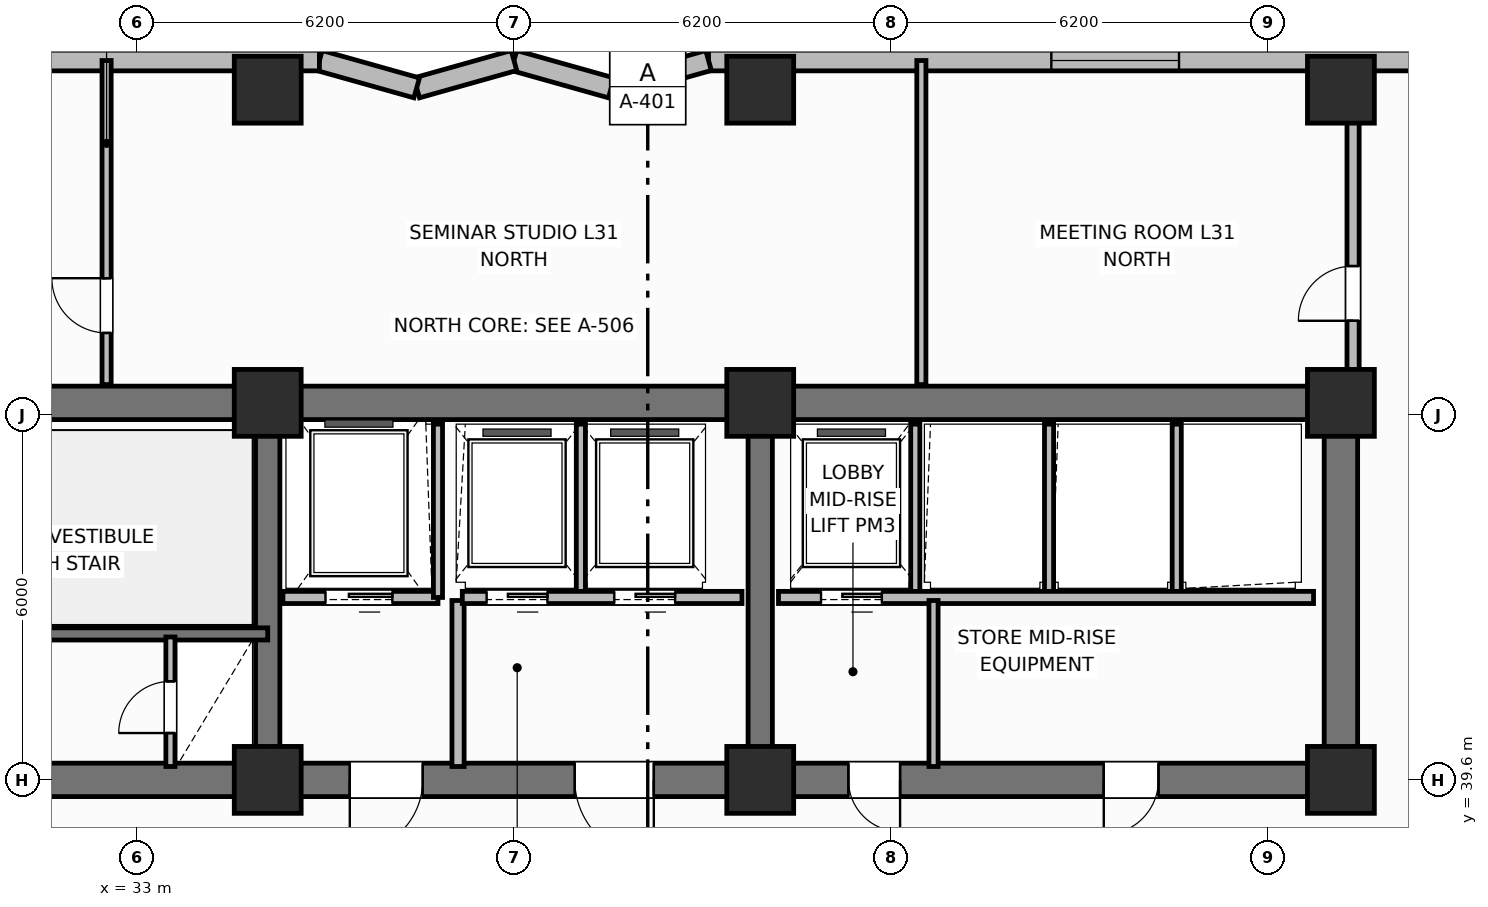
"""IFC4 building model, lengths in metres.
Left out: names, types, materials, properties, quantities, classifications, styles, units other than length and angle.
Written with IfcOpenShell. Run it as: python <this file> out.ifc"""

import sys

from ifc_helpers import new_model, si_unit, direction, frame, frame_2d, origin, origin_2d, place, context, subcontext, project, spatial, rectangle, extrude, element, fill, save


model = new_model("IFC4")
c1 = context("Model", 3, precision=1e-05, world=origin(), true_north=direction((0.0, 1.0)))
c2 = subcontext(c1, "Body", "Model", "MODEL_VIEW")
j1 = project(units=[si_unit("LENGTHUNIT", "METRE"), si_unit("PLANEANGLEUNIT", "RADIAN")], contexts=[c1])
p1 = place(None, origin())
s1 = spatial("IfcSite", under=j1, at=p1, CompositionType="ELEMENT")
p2 = place(p1, origin())
s2 = spatial("IfcBuilding", under=s1, at=p2, CompositionType="ELEMENT")
p3 = place(p2, frame((0.0, 0.0, 125.3)))
s3 = spatial("IfcBuildingStorey", under=s2, at=p3, CompositionType="ELEMENT", Elevation=125.3)
p4 = place(p3, frame((25.6, 45.8, 0.0), z_axis=(0.0, 0.0, 1.0), x_axis=(1.0, 0.0, 0.0)))
e1 = element("IfcWall", 1, at=p4, inside=s3, PredefinedType="SHEAR", context=c2, shape_type="SweptSolid", body=[
    extrude(rectangle(XDim=27.2, YDim=0.55, at=frame_2d((13.6, 0.0))), origin(), (0.0, 0.0, 1.0), 3.7),
])
p5 = place(p3, frame((52.8, 39.875, 0.0), z_axis=(0.0, 0.0, 1.0), x_axis=(0.0, 1.0, 0.0)))
e2 = element("IfcWall", 2, at=p5, inside=s3, PredefinedType="SHEAR", context=c2, shape_type="SweptSolid", body=[
    extrude(rectangle(XDim=5.65, YDim=0.55, at=frame_2d((2.825, 0.0))), origin(), (0.0, 0.0, 1.0), 3.7),
])
p6 = place(p3, frame((52.8, 39.6, 0.0), z_axis=(0.0, 0.0, 1.0), x_axis=(-1.0, 0.0, 0.0)))
e3 = element("IfcWall", 3, at=p6, inside=s3, PredefinedType="SHEAR", context=c2, shape_type="SweptSolid", body=[
    extrude(rectangle(XDim=27.2, YDim=0.55, at=frame_2d((13.6, 0.0))), origin(), (0.0, 0.0, 1.0), 3.7),
])
p7 = place(p6, frame((24.2, 0.0, 0.0)))
e4 = element("IfcOpeningElement", 4, at=p7, cuts=e3, PredefinedType="OPENING", context=c2, shape_type="SweptSolid", body=[
    extrude(rectangle(XDim=1.1, YDim=2.15, at=frame_2d((0.55, 1.075))), frame((0.0, 0.285, 0.0), z_axis=(0.0, -1.0, 0.0), x_axis=(1.0, 0.0, 0.0)), (0.0, 0.0, 1.0), 0.57),
])
p8 = place(p6, frame((15.1, 0.0, 0.0)))
e5 = element("IfcOpeningElement", 5, at=p8, cuts=e3, PredefinedType="OPENING", context=c2, shape_type="SweptSolid", body=[
    extrude(rectangle(XDim=1.2, YDim=2.15, at=frame_2d((0.6, 1.075))), frame((0.0, 0.285, 0.0), z_axis=(0.0, -1.0, 0.0), x_axis=(1.0, 0.0, 0.0)), (0.0, 0.0, 1.0), 0.57),
])
p9 = place(p6, frame((11.3, 0.0, 0.0)))
e6 = element("IfcOpeningElement", 6, at=p9, cuts=e3, PredefinedType="OPENING", context=c2, shape_type="SweptSolid", body=[
    extrude(rectangle(XDim=1.3, YDim=2.2, at=frame_2d((0.65, 1.1))), frame((0.0, 0.285, 0.0), z_axis=(0.0, -1.0, 0.0), x_axis=(1.0, 0.0, 0.0)), (0.0, 0.0, 1.0), 0.57),
])
p10 = place(p6, frame((7.25, 0.0, 0.0)))
e7 = element("IfcOpeningElement", 7, at=p10, cuts=e3, PredefinedType="OPENING", context=c2, shape_type="SweptSolid", body=[
    extrude(rectangle(XDim=0.85, YDim=2.1, at=frame_2d((0.425, 1.05))), frame((0.0, 0.285, 0.0), z_axis=(0.0, -1.0, 0.0), x_axis=(1.0, 0.0, 0.0)), (0.0, 0.0, 1.0), 0.57),
])
p11 = place(p6, frame((3.0, 0.0, 0.0)))
e8 = element("IfcOpeningElement", 8, at=p11, cuts=e3, PredefinedType="OPENING", context=c2, shape_type="SweptSolid", body=[
    extrude(rectangle(XDim=0.9, YDim=2.1, at=frame_2d((0.45, 1.05))), frame((0.0, 0.285, 0.0), z_axis=(0.0, -1.0, 0.0), x_axis=(1.0, 0.0, 0.0)), (0.0, 0.0, 1.0), 0.57),
])
for number, where, z_axis, x_axis in (
    (9, (35.15, 39.875, 0.0), (0.0, 0.0, 1.0), (0.0, 1.0, 0.0)),
    (10, (43.25, 39.875, 0.0), (0.0, 0.0, 1.0), (0.0, 1.0, 0.0)),
):
    element("IfcWall", number, at=place(p3, frame(where, z_axis=z_axis, x_axis=x_axis)), inside=s3, PredefinedType="SHEAR", context=c2, shape_type="SweptSolid", body=[
        extrude(rectangle(XDim=5.65, YDim=0.4, at=frame_2d((2.825, 0.0))), origin(), (0.0, 0.0, 1.0), 3.7),
    ])
for number, where, z_axis, x_axis in (
    (11, (35.15, 39.6, 0.0), (0.0, 0.0, 1.0), (1.0, 0.0, 0.0)),
    (12, (35.15, 45.8, 0.0), (0.0, 0.0, 1.0), (1.0, 0.0, 0.0)),
    (13, (43.25, 39.6, 0.0), (0.0, 0.0, 1.0), (1.0, 0.0, 0.0)),
    (14, (43.25, 45.8, 0.0), (0.0, 0.0, 1.0), (1.0, 0.0, 0.0)),
    (15, (52.8, 39.6, 0.0), (0.0, 0.0, 1.0), (1.0, 0.0, 0.0)),
    (16, (52.8, 45.8, 0.0), (0.0, 0.0, 1.0), (1.0, 0.0, 0.0)),
    (17, (35.15, 50.95, 0.0), (0.0, 0.0, 1.0), (1.0, 0.0, 0.0)),
    (18, (43.25, 50.95, 0.0), (0.0, 0.0, 1.0), (1.0, 0.0, 0.0)),
    (19, (52.8, 50.95, 0.0), (0.0, 0.0, 1.0), (1.0, 0.0, 0.0)),
):
    element("IfcColumn", number, at=place(p3, frame(where, z_axis=z_axis, x_axis=x_axis)), inside=s3, PredefinedType="COLUMN", context=c2, shape_type="SweptSolid", body=[
        extrude(rectangle(XDim=1.1, YDim=1.1, at=origin_2d()), origin(), (0.0, 0.0, 1.0), 3.7),
    ])
p12 = place(p3, frame((59.8, 51.43, 0.0), z_axis=(0.0, 0.0, 1.0), x_axis=(-1.0, 0.0, 0.0)))
e20 = element("IfcWall", 20, at=p12, inside=s3, PredefinedType="SOLIDWALL", context=c2, shape_type="SweptSolid", body=[
    extrude(rectangle(XDim=17.4, YDim=0.34, at=frame_2d((8.7, 0.0))), origin(), (0.0, 0.0, 1.0), 2.7),
])
p13 = place(p12, frame((1.613, 0.0, 0.68)))
e21 = element("IfcOpeningElement", 21, at=p13, cuts=e20, PredefinedType="OPENING", context=c2, shape_type="SweptSolid", body=[
    extrude(rectangle(XDim=2.1, YDim=1.9, at=frame_2d((1.05, 0.95))), frame((0.0, 0.18, 0.0), z_axis=(0.0, -1.0, 0.0), x_axis=(1.0, 0.0, 0.0)), (0.0, 0.0, 1.0), 0.36),
])
p14 = place(p12, frame((9.663, 0.0, 0.68)))
e22 = element("IfcOpeningElement", 22, at=p14, cuts=e20, PredefinedType="OPENING", context=c2, shape_type="SweptSolid", body=[
    extrude(rectangle(XDim=2.1, YDim=1.9, at=frame_2d((1.05, 0.95))), frame((0.0, 0.18, 0.0), z_axis=(0.0, -1.0, 0.0), x_axis=(1.0, 0.0, 0.0)), (0.0, 0.0, 1.0), 0.36),
])
p15 = place(p3, frame((42.4, 51.43, 0.0), z_axis=(0.0, 0.0, 1.0), x_axis=(-0.962652136636, -0.270741322725, 0.0)))
e23 = element("IfcWall", 23, at=p15, inside=s3, PredefinedType="SOLIDWALL", context=c2, shape_type="SweptSolid", body=[
    extrude(rectangle(XDim=1.662, YDim=0.34, at=frame_2d((0.831, 0.0))), origin(), (0.0, 0.0, 1.0), 2.7),
])
p16 = place(p3, frame((40.8, 50.98, 0.0), z_axis=(0.0, 0.0, 1.0), x_axis=(-0.962662902433, 0.270703040766, 0.0)))
e24 = element("IfcWall", 24, at=p16, inside=s3, PredefinedType="SOLIDWALL", context=c2, shape_type="SweptSolid", body=[
    extrude(rectangle(XDim=1.662, YDim=0.34, at=frame_2d((0.831, 0.0))), origin(), (0.0, 0.0, 1.0), 2.7),
])
p17 = place(p3, frame((39.2, 51.43, 0.0), z_axis=(0.0, 0.0, 1.0), x_axis=(-0.962652136636, -0.270741322725, 0.0)))
e25 = element("IfcWall", 25, at=p17, inside=s3, PredefinedType="SOLIDWALL", context=c2, shape_type="SweptSolid", body=[
    extrude(rectangle(XDim=1.662, YDim=0.34, at=frame_2d((0.831, 0.0))), origin(), (0.0, 0.0, 1.0), 2.7),
])
p18 = place(p3, frame((37.6, 50.98, 0.0), z_axis=(0.0, 0.0, 1.0), x_axis=(-0.962662902433, 0.270703040766, 0.0)))
e26 = element("IfcWall", 26, at=p18, inside=s3, PredefinedType="SOLIDWALL", context=c2, shape_type="SweptSolid", body=[
    extrude(rectangle(XDim=1.662, YDim=0.34, at=frame_2d((0.831, 0.0))), origin(), (0.0, 0.0, 1.0), 2.7),
])
p19 = place(p3, frame((36.0, 51.43, 0.0), z_axis=(0.0, 0.0, 1.0), x_axis=(-1.0, 0.0, 0.0)))
e27 = element("IfcWall", 27, at=p19, inside=s3, PredefinedType="SOLIDWALL", context=c2, shape_type="SweptSolid", body=[
    extrude(rectangle(XDim=17.4, YDim=0.34, at=frame_2d((8.7, 0.0))), origin(), (0.0, 0.0, 1.0), 2.7),
])
p20 = place(p19, frame((5.637, 0.0, 0.68)))
e28 = element("IfcOpeningElement", 28, at=p20, cuts=e27, PredefinedType="OPENING", context=c2, shape_type="SweptSolid", body=[
    extrude(rectangle(XDim=2.1, YDim=1.9, at=frame_2d((1.05, 0.95))), frame((0.0, 0.18, 0.0), z_axis=(0.0, -1.0, 0.0), x_axis=(1.0, 0.0, 0.0)), (0.0, 0.0, 1.0), 0.36),
])
p21 = place(p19, frame((13.688, 0.0, 0.68)))
e29 = element("IfcOpeningElement", 29, at=p21, cuts=e27, PredefinedType="OPENING", context=c2, shape_type="SweptSolid", body=[
    extrude(rectangle(XDim=2.1, YDim=1.9, at=frame_2d((1.05, 0.95))), frame((0.0, 0.18, 0.0), z_axis=(0.0, -1.0, 0.0), x_axis=(1.0, 0.0, 0.0)), (0.0, 0.0, 1.0), 0.36),
])
p22 = place(p3, frame((35.15, 42.0, 0.0), z_axis=(0.0, 0.0, 1.0), x_axis=(-1.0, 0.0, 0.0)))
e30 = element("IfcWall", 30, at=p22, inside=s3, PredefinedType="SHEAR", context=c2, shape_type="SweptSolid", body=[
    extrude(rectangle(XDim=9.55, YDim=0.2, at=frame_2d((4.775, 0.0))), origin(), (0.0, 0.0, 1.0), 3.7),
])
p23 = place(p22, frame((7.25, 0.0, 0.0)))
e31 = element("IfcOpeningElement", 31, at=p23, cuts=e30, PredefinedType="OPENING", context=c2, shape_type="SweptSolid", body=[
    extrude(rectangle(XDim=1.1, YDim=2.15, at=frame_2d((0.55, 1.075))), frame((0.0, 0.11, 0.0), z_axis=(0.0, -1.0, 0.0), x_axis=(1.0, 0.0, 0.0)), (0.0, 0.0, 1.0), 0.22),
])
p24 = place(p3, frame((33.55, 39.82, 0.0), z_axis=(0.0, 0.0, 1.0), x_axis=(0.0, 1.0, 0.0)))
e32 = element("IfcWall", 32, at=p24, inside=s3, PredefinedType="PARTITIONING", context=c2, shape_type="SweptSolid", body=[
    extrude(rectangle(XDim=2.13, YDim=0.15, at=frame_2d((1.065, 0.0))), origin(), (0.0, 0.0, 1.0), 2.53),
])
p25 = place(p24, frame((0.55, 0.0, 0.0)))
e33 = element("IfcOpeningElement", 33, at=p25, cuts=e32, PredefinedType="OPENING", context=c2, shape_type="SweptSolid", body=[
    extrude(rectangle(XDim=0.85, YDim=2.05, at=frame_2d((0.425, 1.025))), frame((0.0, 0.085, 0.0), z_axis=(0.0, -1.0, 0.0), x_axis=(1.0, 0.0, 0.0)), (0.0, 0.0, 1.0), 0.17),
])
p26 = place(p3, frame((37.95, 42.6, 0.0), z_axis=(0.0, 0.0, 1.0), x_axis=(-1.0, 0.0, 0.0)))
e34 = element("IfcWall", 34, at=p26, inside=s3, PredefinedType="PARTITIONING", context=c2, shape_type="SweptSolid", body=[
    extrude(rectangle(XDim=2.55, YDim=0.2, at=frame_2d((1.275, 0.0))), origin(), (0.0, 0.0, 1.0), 2.3),
])
p27 = place(p26, frame((0.75, 0.0, 0.0)))
e35 = element("IfcOpeningElement", 35, at=p27, cuts=e34, PredefinedType="OPENING", context=c2, shape_type="SweptSolid", body=[
    extrude(rectangle(XDim=1.1, YDim=2.15, at=frame_2d((0.55, 1.075))), frame((0.0, 0.11, 0.0), z_axis=(0.0, -1.0, 0.0), x_axis=(1.0, 0.0, 0.0)), (0.0, 0.0, 1.0), 0.22),
])
p28 = place(p3, frame((37.95, 42.6, 0.0), z_axis=(0.0, 0.0, 1.0), x_axis=(0.0, 1.0, 0.0)))
e36 = element("IfcWall", 36, at=p28, inside=s3, PredefinedType="PARTITIONING", context=c2, shape_type="SweptSolid", body=[
    extrude(rectangle(XDim=2.85, YDim=0.15, at=frame_2d((1.425, 0.0))), origin(), (0.0, 0.0, 1.0), 2.53),
])
p29 = place(p3, frame((38.28, 39.82, 0.0), z_axis=(0.0, 0.0, 1.0), x_axis=(0.0, 1.0, 0.0)))
e37 = element("IfcWall", 37, at=p29, inside=s3, PredefinedType="PARTITIONING", context=c2, shape_type="SweptSolid", body=[
    extrude(rectangle(XDim=2.73, YDim=0.2, at=frame_2d((1.365, 0.0))), origin(), (0.0, 0.0, 1.0), 2.53),
])
p30 = place(p3, frame((40.3, 42.65, 0.0), z_axis=(0.0, 0.0, 1.0), x_axis=(0.0, 1.0, 0.0)))
e38 = element("IfcWall", 38, at=p30, inside=s3, PredefinedType="PARTITIONING", context=c2, shape_type="SweptSolid", body=[
    extrude(rectangle(XDim=2.8, YDim=0.15, at=frame_2d((1.4, 0.0))), origin(), (0.0, 0.0, 1.0), 2.53),
])
p31 = place(p3, frame((42.95, 42.6, 0.0), z_axis=(0.0, 0.0, 1.0), x_axis=(-1.0, 0.0, 0.0)))
e39 = element("IfcWall", 39, at=p31, inside=s3, PredefinedType="PARTITIONING", context=c2, shape_type="SweptSolid", body=[
    extrude(rectangle(XDim=4.6, YDim=0.2, at=frame_2d((2.3, 0.0))), origin(), (0.0, 0.0, 1.0), 2.3),
])
p32 = place(p31, frame((3.2, 0.0, 0.0)))
e40 = element("IfcOpeningElement", 40, at=p32, cuts=e39, PredefinedType="OPENING", context=c2, shape_type="SweptSolid", body=[
    extrude(rectangle(XDim=1.0, YDim=2.15, at=frame_2d((0.5, 1.075))), frame((0.0, 0.11, 0.0), z_axis=(0.0, -1.0, 0.0), x_axis=(1.0, 0.0, 0.0)), (0.0, 0.0, 1.0), 0.22),
])
p33 = place(p31, frame((1.1, 0.0, 0.0)))
e41 = element("IfcOpeningElement", 41, at=p33, cuts=e39, PredefinedType="OPENING", context=c2, shape_type="SweptSolid", body=[
    extrude(rectangle(XDim=1.0, YDim=2.15, at=frame_2d((0.5, 1.075))), frame((0.0, 0.11, 0.0), z_axis=(0.0, -1.0, 0.0), x_axis=(1.0, 0.0, 0.0)), (0.0, 0.0, 1.0), 0.22),
])
for number, where, z_axis, x_axis in (
    (42, (45.8, 42.65, 0.0), (0.0, 0.0, 1.0), (0.0, 1.0, 0.0)),
    (43, (48.0, 42.65, 0.0), (0.0, 0.0, 1.0), (0.0, 1.0, 0.0)),
    (44, (50.1, 42.65, 0.0), (0.0, 0.0, 1.0), (0.0, 1.0, 0.0)),
):
    element("IfcWall", number, at=place(p3, frame(where, z_axis=z_axis, x_axis=x_axis)), inside=s3, PredefinedType="PARTITIONING", context=c2, shape_type="SweptSolid", body=[
        extrude(rectangle(XDim=2.8, YDim=0.15, at=frame_2d((1.4, 0.0))), origin(), (0.0, 0.0, 1.0), 2.53),
    ])
p34 = place(p3, frame((52.35, 42.6, 0.0), z_axis=(0.0, 0.0, 1.0), x_axis=(-1.0, 0.0, 0.0)))
e45 = element("IfcWall", 45, at=p34, inside=s3, PredefinedType="PARTITIONING", context=c2, shape_type="SweptSolid", body=[
    extrude(rectangle(XDim=8.8, YDim=0.2, at=frame_2d((4.4, 0.0))), origin(), (0.0, 0.0, 1.0), 2.53),
])
p35 = place(p34, frame((7.1, 0.0, 0.0)))
e46 = element("IfcOpeningElement", 46, at=p35, cuts=e45, PredefinedType="OPENING", context=c2, shape_type="SweptSolid", body=[
    extrude(rectangle(XDim=1.0, YDim=2.15, at=frame_2d((0.5, 1.075))), frame((0.0, 0.11, 0.0), z_axis=(0.0, -1.0, 0.0), x_axis=(1.0, 0.0, 0.0)), (0.0, 0.0, 1.0), 0.22),
])
p36 = place(p3, frame((46.1, 39.82, 0.0), z_axis=(0.0, 0.0, 1.0), x_axis=(0.0, 1.0, 0.0)))
e47 = element("IfcWall", 47, at=p36, inside=s3, PredefinedType="PARTITIONING", context=c2, shape_type="SweptSolid", body=[
    extrude(rectangle(XDim=2.73, YDim=0.15, at=frame_2d((1.365, 0.0))), origin(), (0.0, 0.0, 1.0), 2.53),
])
p37 = place(p3, frame((32.5, 46.1, 0.0), z_axis=(0.0, 0.0, 1.0), x_axis=(0.0, 1.0, 0.0)))
e48 = element("IfcWall", 48, at=p37, inside=s3, PredefinedType="PARTITIONING", context=c2, shape_type="SweptSolid", body=[
    extrude(rectangle(XDim=5.33, YDim=0.15, at=frame_2d((2.665, 0.0))), origin(), (0.0, 0.0, 1.0), 2.53),
])
p38 = place(p37, frame((0.85, 0.0, 0.0)))
e49 = element("IfcOpeningElement", 49, at=p38, cuts=e48, PredefinedType="OPENING", context=c2, shape_type="SweptSolid", body=[
    extrude(rectangle(XDim=0.9, YDim=2.1, at=frame_2d((0.45, 1.05))), frame((0.0, 0.085, 0.0), z_axis=(0.0, -1.0, 0.0), x_axis=(1.0, 0.0, 0.0)), (0.0, 0.0, 1.0), 0.17),
])
p39 = place(p3, frame((45.9, 46.1, 0.0), z_axis=(0.0, 0.0, 1.0), x_axis=(0.0, 1.0, 0.0)))
e50 = element("IfcWall", 50, at=p39, inside=s3, PredefinedType="PARTITIONING", context=c2, shape_type="SweptSolid", body=[
    extrude(rectangle(XDim=5.33, YDim=0.15, at=frame_2d((2.665, 0.0))), origin(), (0.0, 0.0, 1.0), 2.53),
])
p40 = place(p3, frame((53.0, 46.1, 0.0), z_axis=(0.0, 0.0, 1.0), x_axis=(0.0, 1.0, 0.0)))
e51 = element("IfcWall", 51, at=p40, inside=s3, PredefinedType="PARTITIONING", context=c2, shape_type="SweptSolid", body=[
    extrude(rectangle(XDim=4.53, YDim=0.2, at=frame_2d((2.265, 0.0))), origin(), (0.0, 0.0, 1.0), 2.53),
])
p41 = place(p40, frame((1.05, 0.0, 0.0)))
e52 = element("IfcOpeningElement", 52, at=p41, cuts=e51, PredefinedType="OPENING", context=c2, shape_type="SweptSolid", body=[
    extrude(rectangle(XDim=0.9, YDim=2.1, at=frame_2d((0.45, 1.05))), frame((0.0, 0.11, 0.0), z_axis=(0.0, -1.0, 0.0), x_axis=(1.0, 0.0, 0.0)), (0.0, 0.0, 1.0), 0.22),
])
p42 = place(p14, origin())
e53 = element("IfcWindow", 53, at=p42, inside=s3, PartitioningType="SINGLE_PANEL", PredefinedType="WINDOW", context=c2, shape_type="SweptSolid", body=[
    extrude(rectangle(XDim=2.1, YDim=1.9, at=frame_2d((1.05, 0.95))), frame((0.0, 0.03, 0.0), z_axis=(0.0, -1.0, 0.0), x_axis=(1.0, 0.0, 0.0)), (0.0, 0.0, 1.0), 0.06),
])
fill(e22, e53)
p43 = place(p25, origin())
e54 = element("IfcDoor", 54, at=p43, inside=s3, OperationType="SINGLE_SWING_LEFT", PredefinedType="TRAPDOOR", context=c2, shape_type="SweptSolid", body=[
    extrude(rectangle(XDim=0.85, YDim=2.05, at=frame_2d((0.425, 1.025))), frame((0.0, 0.025, 0.0), z_axis=(0.0, -1.0, 0.0), x_axis=(1.0, 0.0, 0.0)), (0.0, 0.0, 1.0), 0.05),
])
fill(e33, e54)
p44 = place(p27, origin())
e55 = element("IfcDoor", 55, at=p44, inside=s3, OperationType="SLIDING_TO_LEFT", PredefinedType="DOOR", context=c2, shape_type="SweptSolid", body=[
    extrude(rectangle(XDim=1.1, YDim=2.15, at=frame_2d((0.55, 1.075))), frame((0.0, 0.025, 0.0), z_axis=(0.0, -1.0, 0.0), x_axis=(1.0, 0.0, 0.0)), (0.0, 0.0, 1.0), 0.05),
])
fill(e35, e55)
p45 = place(p32, origin())
e56 = element("IfcDoor", 56, at=p45, inside=s3, OperationType="SLIDING_TO_LEFT", PredefinedType="DOOR", context=c2, shape_type="SweptSolid", body=[
    extrude(rectangle(XDim=1.0, YDim=2.15, at=frame_2d((0.5, 1.075))), frame((0.0, 0.025, 0.0), z_axis=(0.0, -1.0, 0.0), x_axis=(1.0, 0.0, 0.0)), (0.0, 0.0, 1.0), 0.05),
])
fill(e40, e56)
p46 = place(p33, origin())
e57 = element("IfcDoor", 57, at=p46, inside=s3, OperationType="SLIDING_TO_LEFT", PredefinedType="DOOR", context=c2, shape_type="SweptSolid", body=[
    extrude(rectangle(XDim=1.0, YDim=2.15, at=frame_2d((0.5, 1.075))), frame((0.0, 0.025, 0.0), z_axis=(0.0, -1.0, 0.0), x_axis=(1.0, 0.0, 0.0)), (0.0, 0.0, 1.0), 0.05),
])
fill(e41, e57)
p47 = place(p35, origin())
e58 = element("IfcDoor", 58, at=p47, inside=s3, OperationType="SLIDING_TO_LEFT", PredefinedType="DOOR", context=c2, shape_type="SweptSolid", body=[
    extrude(rectangle(XDim=1.0, YDim=2.15, at=frame_2d((0.5, 1.075))), frame((0.0, 0.025, 0.0), z_axis=(0.0, -1.0, 0.0), x_axis=(1.0, 0.0, 0.0)), (0.0, 0.0, 1.0), 0.05),
])
fill(e46, e58)
p48 = place(p38, origin())
e59 = element("IfcDoor", 59, at=p48, inside=s3, OperationType="SINGLE_SWING_RIGHT", PredefinedType="DOOR", context=c2, shape_type="SweptSolid", body=[
    extrude(rectangle(XDim=0.9, YDim=2.1, at=frame_2d((0.45, 1.05))), frame((0.0, 0.025, 0.0), z_axis=(0.0, -1.0, 0.0), x_axis=(1.0, 0.0, 0.0)), (0.0, 0.0, 1.0), 0.05),
])
fill(e49, e59)
p49 = place(p41, origin())
e60 = element("IfcDoor", 60, at=p49, inside=s3, OperationType="SINGLE_SWING_LEFT", PredefinedType="DOOR", context=c2, shape_type="SweptSolid", body=[
    extrude(rectangle(XDim=0.9, YDim=2.1, at=frame_2d((0.45, 1.05))), frame((0.0, 0.025, 0.0), z_axis=(0.0, -1.0, 0.0), x_axis=(1.0, 0.0, 0.0)), (0.0, 0.0, 1.0), 0.05),
])
fill(e52, e60)
p50 = place(p8, origin())
e61 = element("IfcDoor", 61, at=p50, inside=s3, OperationType="SINGLE_SWING_RIGHT", PredefinedType="DOOR", context=c2, shape_type="SweptSolid", body=[
    extrude(rectangle(XDim=1.2, YDim=2.15, at=frame_2d((0.6, 1.075))), frame((0.0, 0.025, 0.0), z_axis=(0.0, -1.0, 0.0), x_axis=(1.0, 0.0, 0.0)), (0.0, 0.0, 1.0), 0.05),
])
fill(e5, e61)
p51 = place(p9, origin())
e62 = element("IfcDoor", 62, at=p51, inside=s3, OperationType="SINGLE_SWING_LEFT", PredefinedType="DOOR", context=c2, shape_type="SweptSolid", body=[
    extrude(rectangle(XDim=1.3, YDim=2.2, at=frame_2d((0.65, 1.1))), frame((0.0, 0.025, 0.0), z_axis=(0.0, -1.0, 0.0), x_axis=(1.0, 0.0, 0.0)), (0.0, 0.0, 1.0), 0.05),
])
fill(e6, e62)
p52 = place(p10, origin())
e63 = element("IfcDoor", 63, at=p52, inside=s3, OperationType="SINGLE_SWING_LEFT", PredefinedType="DOOR", context=c2, shape_type="SweptSolid", body=[
    extrude(rectangle(XDim=0.85, YDim=2.1, at=frame_2d((0.425, 1.05))), frame((0.0, 0.025, 0.0), z_axis=(0.0, -1.0, 0.0), x_axis=(1.0, 0.0, 0.0)), (0.0, 0.0, 1.0), 0.05),
])
fill(e7, e63)
p53 = place(p11, origin())
e64 = element("IfcDoor", 64, at=p53, inside=s3, OperationType="SINGLE_SWING_RIGHT", PredefinedType="DOOR", context=c2, shape_type="SweptSolid", body=[
    extrude(rectangle(XDim=0.9, YDim=2.1, at=frame_2d((0.45, 1.05))), frame((0.0, 0.025, 0.0), z_axis=(0.0, -1.0, 0.0), x_axis=(1.0, 0.0, 0.0)), (0.0, 0.0, 1.0), 0.05),
])
fill(e8, e64)
save(model, sys.argv[1])
